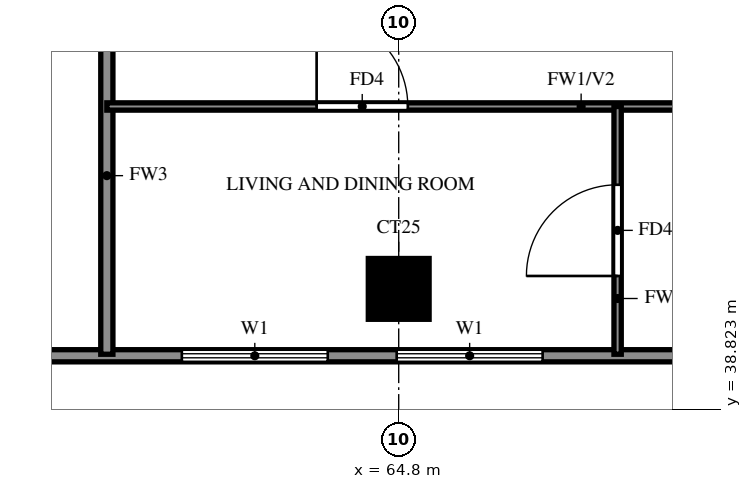
"""IFC4 building model, lengths in metres.
Left out: names, types, materials, properties, quantities, classifications, styles, units other than length and angle.
Written with IfcOpenShell. Run it as: python <this file> out.ifc"""

import sys

from ifc_helpers import new_model, si_unit, direction, frame, frame_2d, origin, origin_2d, place, context, subcontext, project, spatial, rectangle, extrude, source, transform, mapped, element, fill, save


model = new_model("IFC4")
c1 = context("Model", 3, precision=1e-05, world=origin(), true_north=direction((0.0, 1.0)))
c2 = subcontext(c1, "Body", "Model", "MODEL_VIEW")
j1 = project(units=[si_unit("LENGTHUNIT", "METRE"), si_unit("PLANEANGLEUNIT", "RADIAN")], contexts=[c1])
p1 = place(None, origin())
s1 = spatial("IfcSite", under=j1, at=p1, CompositionType="ELEMENT")
p2 = place(p1, origin())
s2 = spatial("IfcBuilding", under=s1, at=p2, CompositionType="ELEMENT")
p3 = place(p2, frame((0.0, 0.0, 164.0)))
s3 = spatial("IfcBuildingStorey", under=s2, at=p3, CompositionType="ELEMENT", Elevation=164.0)
m1 = source(origin(), c2, "Body", "SweptSolid", [
    extrude(rectangle(XDim=1.0, YDim=1.0, at=origin_2d()), origin(), (0.0, 0.0, 1.0), 3.2),
])
p4 = place(p3, frame((64.8, 40.8, 0.0), z_axis=(0.0, 0.0, 1.0), x_axis=(1.0, 0.0, 0.0)))
e1 = element("IfcColumn", 1, at=p4, inside=s3, PredefinedType="COLUMN", context=c2, shape_type="MappedRepresentation", body=[
    mapped(m1, transform((0.0, 0.0, 0.0))),
])
p5 = place(p3, frame((58.8, 39.7, 0.0), z_axis=(0.0, 0.0, 1.0), x_axis=(1.0, 0.0, 0.0)))
e2 = element("IfcWall", 2, at=p5, inside=s3, PredefinedType="SOLIDWALL", context=c2, shape_type="SweptSolid", body=[
    extrude(rectangle(XDim=27.23, YDim=0.2, at=frame_2d((13.615, 0.0))), origin(), (0.0, 0.0, 1.0), 3.2),
])
p6 = place(p5, frame((2.433, 0.0, 0.6)))
e3 = element("IfcOpeningElement", 3, at=p6, cuts=e2, PredefinedType="OPENING", context=c2, shape_type="SweptSolid", body=[
    extrude(rectangle(XDim=2.4, YDim=2.4, at=frame_2d((1.2, 1.2))), frame((0.0, 0.11, 0.0), z_axis=(0.0, -1.0, 0.0), x_axis=(1.0, 0.0, 0.0)), (0.0, 0.0, 1.0), 0.22),
])
p7 = place(p5, frame((5.967, 0.0, 0.6)))
e4 = element("IfcOpeningElement", 4, at=p7, cuts=e2, PredefinedType="OPENING", context=c2, shape_type="SweptSolid", body=[
    extrude(rectangle(XDim=2.4, YDim=2.4, at=frame_2d((1.2, 1.2))), frame((0.0, 0.11, 0.0), z_axis=(0.0, -1.0, 0.0), x_axis=(1.0, 0.0, 0.0)), (0.0, 0.0, 1.0), 0.22),
])
p8 = place(p5, frame((13.72, 0.0, 0.6)))
e5 = element("IfcOpeningElement", 5, at=p8, cuts=e2, PredefinedType="OPENING", context=c2, shape_type="SweptSolid", body=[
    extrude(rectangle(XDim=2.4, YDim=2.4, at=frame_2d((1.2, 1.2))), frame((0.0, 0.11, 0.0), z_axis=(0.0, -1.0, 0.0), x_axis=(1.0, 0.0, 0.0)), (0.0, 0.0, 1.0), 0.22),
])
p9 = place(p5, frame((16.541, 0.0, 0.6)))
e6 = element("IfcOpeningElement", 6, at=p9, cuts=e2, PredefinedType="OPENING", context=c2, shape_type="SweptSolid", body=[
    extrude(rectangle(XDim=2.4, YDim=2.4, at=frame_2d((1.2, 1.2))), frame((0.0, 0.11, 0.0), z_axis=(0.0, -1.0, 0.0), x_axis=(1.0, 0.0, 0.0)), (0.0, 0.0, 1.0), 0.22),
])
p10 = place(p5, frame((19.361, 0.0, 0.6)))
e7 = element("IfcOpeningElement", 7, at=p10, cuts=e2, PredefinedType="OPENING", context=c2, shape_type="SweptSolid", body=[
    extrude(rectangle(XDim=2.4, YDim=2.4, at=frame_2d((1.2, 1.2))), frame((0.0, 0.11, 0.0), z_axis=(0.0, -1.0, 0.0), x_axis=(1.0, 0.0, 0.0)), (0.0, 0.0, 1.0), 0.22),
])
p11 = place(p5, frame((22.181, 0.0, 0.6)))
e8 = element("IfcOpeningElement", 8, at=p11, cuts=e2, PredefinedType="OPENING", context=c2, shape_type="SweptSolid", body=[
    extrude(rectangle(XDim=2.4, YDim=2.4, at=frame_2d((1.2, 1.2))), frame((0.0, 0.11, 0.0), z_axis=(0.0, -1.0, 0.0), x_axis=(1.0, 0.0, 0.0)), (0.0, 0.0, 1.0), 0.22),
])
p12 = place(p5, frame((25.99, 0.0, 0.6)))
e9 = element("IfcOpeningElement", 9, at=p12, cuts=e2, PredefinedType="OPENING", context=c2, shape_type="SweptSolid", body=[
    extrude(rectangle(XDim=0.9, YDim=2.4, at=frame_2d((0.45, 1.2))), frame((0.0, 0.11, 0.0), z_axis=(0.0, -1.0, 0.0), x_axis=(1.0, 0.0, 0.0)), (0.0, 0.0, 1.0), 0.22),
])
p13 = place(p3, frame((60.0, 39.725, 0.0), z_axis=(0.0, 0.0, 1.0), x_axis=(0.0, 1.0, 0.0)))
e10 = element("IfcWall", 10, at=p13, inside=s3, PredefinedType="SOLIDWALL", context=c2, shape_type="SweptSolid", body=[
    extrude(rectangle(XDim=5.875, YDim=0.2, at=frame_2d((2.938, 0.0))), origin(), (0.0, 0.0, 1.0), 3.2),
])
p14 = place(p3, frame((60.0, 43.8, 0.0), z_axis=(0.0, 0.0, 1.0), x_axis=(1.0, 0.0, 0.0)))
e11 = element("IfcWall", 11, at=p14, inside=s3, PredefinedType="PARTITIONING", context=c2, shape_type="SweptSolid", body=[
    extrude(rectangle(XDim=15.6, YDim=0.12, at=frame_2d((7.8, 0.0))), origin(), (0.0, 0.0, 1.0), 3.2),
])
p15 = place(p14, frame((9.75, 0.0, 0.0)))
e12 = element("IfcOpeningElement", 12, at=p15, cuts=e11, PredefinedType="OPENING", context=c2, shape_type="SweptSolid", body=[
    extrude(rectangle(XDim=0.9, YDim=2.1, at=frame_2d((0.45, 1.05))), frame((0.0, 0.07, 0.0), z_axis=(0.0, -1.0, 0.0), x_axis=(1.0, 0.0, 0.0)), (0.0, 0.0, 1.0), 0.14),
])
p16 = place(p14, frame((3.45, 0.0, 0.0)))
e13 = element("IfcOpeningElement", 13, at=p16, cuts=e11, PredefinedType="OPENING", context=c2, shape_type="SweptSolid", body=[
    extrude(rectangle(XDim=1.5, YDim=2.1, at=frame_2d((0.75, 1.05))), frame((0.0, 0.07, 0.0), z_axis=(0.0, -1.0, 0.0), x_axis=(1.0, 0.0, 0.0)), (0.0, 0.0, 1.0), 0.14),
])
p17 = place(p14, frame((13.4, 0.0, 0.0)))
e14 = element("IfcOpeningElement", 14, at=p17, cuts=e11, PredefinedType="OPENING", context=c2, shape_type="SweptSolid", body=[
    extrude(rectangle(XDim=0.8, YDim=2.1, at=frame_2d((0.4, 1.05))), frame((0.0, 0.07, 0.0), z_axis=(0.0, -1.0, 0.0), x_axis=(1.0, 0.0, 0.0)), (0.0, 0.0, 1.0), 0.14),
])
p18 = place(p3, frame((68.4, 39.725, 0.0), z_axis=(0.0, 0.0, 1.0), x_axis=(0.0, 1.0, 0.0)))
e15 = element("IfcWall", 15, at=p18, inside=s3, PredefinedType="PARTITIONING", context=c2, shape_type="SweptSolid", body=[
    extrude(rectangle(XDim=4.075, YDim=0.12, at=frame_2d((2.038, 0.0))), origin(), (0.0, 0.0, 1.0), 3.2),
])
p19 = place(p18, frame((1.288, 0.0, 0.0)))
e16 = element("IfcOpeningElement", 16, at=p19, cuts=e15, PredefinedType="OPENING", context=c2, shape_type="SweptSolid", body=[
    extrude(rectangle(XDim=1.5, YDim=2.1, at=frame_2d((0.75, 1.05))), frame((0.0, 0.07, 0.0), z_axis=(0.0, -1.0, 0.0), x_axis=(1.0, 0.0, 0.0)), (0.0, 0.0, 1.0), 0.14),
])
p20 = place(p6, origin())
e17 = element("IfcWindow", 17, at=p20, inside=s3, PartitioningType="DOUBLE_PANEL_VERTICAL", PredefinedType="WINDOW", context=c2, shape_type="SweptSolid", body=[
    extrude(rectangle(XDim=2.4, YDim=2.4, at=frame_2d((1.2, 1.2))), frame((0.0, 0.03, 0.0), z_axis=(0.0, -1.0, 0.0), x_axis=(1.0, 0.0, 0.0)), (0.0, 0.0, 1.0), 0.06),
])
fill(e3, e17)
p21 = place(p7, origin())
e18 = element("IfcWindow", 18, at=p21, inside=s3, PartitioningType="DOUBLE_PANEL_VERTICAL", PredefinedType="WINDOW", context=c2, shape_type="SweptSolid", body=[
    extrude(rectangle(XDim=2.4, YDim=2.4, at=frame_2d((1.2, 1.2))), frame((0.0, 0.03, 0.0), z_axis=(0.0, -1.0, 0.0), x_axis=(1.0, 0.0, 0.0)), (0.0, 0.0, 1.0), 0.06),
])
fill(e4, e18)
p22 = place(p19, origin())
e19 = element("IfcDoor", 19, at=p22, inside=s3, OperationType="SINGLE_SWING_LEFT", PredefinedType="DOOR", context=c2, shape_type="SweptSolid", body=[
    extrude(rectangle(XDim=1.5, YDim=2.1, at=frame_2d((0.75, 1.05))), frame((0.0, 0.025, 0.0), z_axis=(0.0, -1.0, 0.0), x_axis=(1.0, 0.0, 0.0)), (0.0, 0.0, 1.0), 0.05),
])
fill(e16, e19)
p23 = place(p16, origin())
e20 = element("IfcDoor", 20, at=p23, inside=s3, OperationType="SINGLE_SWING_RIGHT", PredefinedType="DOOR", context=c2, shape_type="SweptSolid", body=[
    extrude(rectangle(XDim=1.5, YDim=2.1, at=frame_2d((0.75, 1.05))), frame((0.0, 0.025, 0.0), z_axis=(0.0, -1.0, 0.0), x_axis=(1.0, 0.0, 0.0)), (0.0, 0.0, 1.0), 0.05),
])
fill(e13, e20)
save(model, sys.argv[1])
